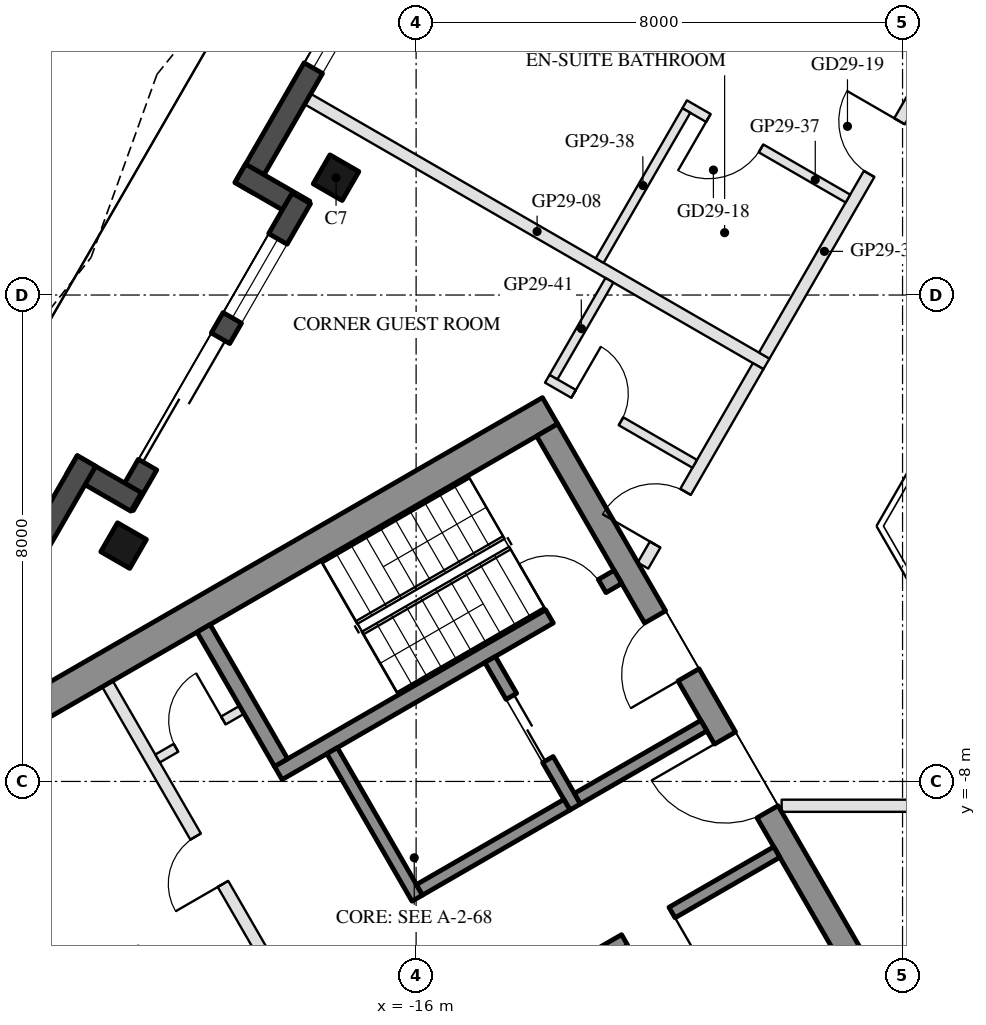
"""IFC4 building model, lengths in metres.
Left out: names, types, materials, properties, quantities, classifications, styles, units other than length and angle.
Written with IfcOpenShell. Run it as: python <this file> out.ifc"""

import sys

from ifc_helpers import new_model, si_unit, direction, frame, frame_2d, origin, origin_2d, place, context, subcontext, project, spatial, rectangle, hollow_rectangle, extrude, boolean, halfspace, element, fill, save


model = new_model("IFC4")
c1 = context("Model", 3, precision=1e-05, world=origin(), true_north=direction((0.0, 1.0)))
c2 = subcontext(c1, "Body", "Model", "MODEL_VIEW")
j1 = project(units=[si_unit("LENGTHUNIT", "METRE"), si_unit("PLANEANGLEUNIT", "RADIAN")], contexts=[c1])
p1 = place(None, origin())
s1 = spatial("IfcSite", under=j1, at=p1, CompositionType="ELEMENT")
p2 = place(p1, origin())
s2 = spatial("IfcBuilding", under=s1, at=p2, CompositionType="ELEMENT")
p3 = place(p2, frame((0.0, 0.0, 294.8)))
s3 = spatial("IfcBuildingStorey", under=s2, at=p3, CompositionType="ELEMENT", Elevation=294.8)
p4 = place(p3, frame((-17.317, 1.93, 0.0), z_axis=(0.0, 0.0, 1.0), x_axis=(0.5, 0.866025403784, 0.0)))
e1 = element("IfcColumn", 1, at=p4, inside=s3, PredefinedType="COLUMN", context=c2, shape_type="SweptSolid", body=[
    boolean("DIFFERENCE", extrude(hollow_rectangle(XDim=0.55, YDim=0.55, WallThickness=0.025, at=origin_2d()), origin(), (0.0, 0.0, 1.0), 3.7), halfspace(frame((0.0, 0.0, 3.666), z_axis=(0.0, 0.0, 1.0), x_axis=(1.0, 0.0, 0.0)), False)),
])
p5 = place(p3, frame((-20.81, -4.121, 0.0), z_axis=(0.0, 0.0, 1.0), x_axis=(0.5, 0.866025403784, 0.0)))
e2 = element("IfcColumn", 2, at=p5, inside=s3, PredefinedType="COLUMN", context=c2, shape_type="SweptSolid", body=[
    boolean("DIFFERENCE", extrude(hollow_rectangle(XDim=0.55, YDim=0.55, WallThickness=0.025, at=origin_2d()), origin(), (0.0, 0.0, 1.0), 3.7), halfspace(frame((0.0, 0.0, 3.66), z_axis=(0.0, 0.0, 1.0), x_axis=(1.0, 0.0, 0.0)), False)),
])
p6 = place(p3, frame((-14.434, 9.373, 0.0), z_axis=(0.0, 0.0, 1.0), x_axis=(-0.499999835575, -0.866025498715, 0.0)))
e3 = element("IfcWall", 3, at=p6, inside=s3, PredefinedType="SOLIDWALL", context=c2, shape_type="SweptSolid", body=[
    extrude(rectangle(XDim=8.787, YDim=0.35, at=frame_2d((4.394, 0.0))), origin(), (0.0, 0.0, 1.0), 3.55),
])
p7 = place(p6, frame((1.719, 0.0, 0.0)))
e4 = element("IfcOpeningElement", 4, at=p7, cuts=e3, PredefinedType="OPENING", context=c2, shape_type="SweptSolid", body=[
    extrude(rectangle(XDim=2.4, YDim=2.4, at=frame_2d((1.2, 1.2))), frame((0.0, 0.185, 0.0), z_axis=(0.0, -1.0, 0.0), x_axis=(1.0, 0.0, 0.0)), (0.0, 0.0, 1.0), 0.37),
])
p8 = place(p6, frame((5.013, 0.0, 0.3)))
e5 = element("IfcOpeningElement", 5, at=p8, cuts=e3, PredefinedType="OPENING", context=c2, shape_type="SweptSolid", body=[
    extrude(rectangle(XDim=1.5, YDim=2.65, at=frame_2d((0.75, 1.325))), frame((0.0, 0.185, 0.0), z_axis=(0.0, -1.0, 0.0), x_axis=(1.0, 0.0, 0.0)), (0.0, 0.0, 1.0), 0.37),
])
p9 = place(p3, frame((-18.892, 2.002, 0.0), z_axis=(0.0, 0.0, 1.0), x_axis=(0.866042269935, -0.499970785833, 0.0)))
e6 = element("IfcWall", 6, at=p9, inside=s3, PredefinedType="SOLIDWALL", context=c2, shape_type="SweptSolid", body=[
    extrude(rectangle(XDim=1.22, YDim=0.35, at=frame_2d((0.61, 0.0))), origin(), (0.0, 0.0, 1.0), 3.55),
])
p10 = place(p3, frame((-17.888, 1.59, 0.0), z_axis=(0.0, 0.0, 1.0), x_axis=(-0.499987198161, -0.866032794804, 0.0)))
e7 = element("IfcWall", 7, at=p10, inside=s3, PredefinedType="SOLIDWALL", context=c2, shape_type="SweptSolid", body=[
    extrude(rectangle(XDim=5.827, YDim=0.35, at=frame_2d((2.914, 0.0))), origin(), (0.0, 0.0, 1.0), 3.55),
])
p11 = place(p10, frame((2.657, 0.0, 0.0)))
e8 = element("IfcOpeningElement", 8, at=p11, cuts=e7, PredefinedType="OPENING", context=c2, shape_type="SweptSolid", body=[
    extrude(rectangle(XDim=2.4, YDim=2.4, at=frame_2d((1.2, 1.2))), frame((0.0, 0.185, 0.0), z_axis=(0.0, -1.0, 0.0), x_axis=(1.0, 0.0, 0.0)), (0.0, 0.0, 1.0), 0.37),
])
p12 = place(p10, frame((0.77, 0.0, 0.3)))
e9 = element("IfcOpeningElement", 9, at=p12, cuts=e7, PredefinedType="OPENING", context=c2, shape_type="SweptSolid", body=[
    extrude(rectangle(XDim=1.5, YDim=2.65, at=frame_2d((0.75, 1.325))), frame((0.0, 0.185, 0.0), z_axis=(0.0, -1.0, 0.0), x_axis=(1.0, 0.0, 0.0)), (0.0, 0.0, 1.0), 0.37),
])
p13 = place(p3, frame((-20.604, -3.403, 0.0), z_axis=(0.0, 0.0, 1.0), x_axis=(-0.866092288191, 0.499884134912, 0.0)))
e10 = element("IfcWall", 10, at=p13, inside=s3, PredefinedType="SOLIDWALL", context=c2, shape_type="SweptSolid", body=[
    extrude(rectangle(XDim=1.22, YDim=0.35, at=frame_2d((0.61, 0.0))), origin(), (0.0, 0.0, 1.0), 3.55),
])
p14 = place(p3, frame((-21.421, -2.729, 0.0), z_axis=(0.0, 0.0, 1.0), x_axis=(-0.500040399856, -0.86600207766, 0.0)))
e11 = element("IfcWall", 11, at=p14, inside=s3, PredefinedType="SOLIDWALL", context=c2, shape_type="SweptSolid", body=[
    extrude(rectangle(XDim=3.567, YDim=0.35, at=frame_2d((1.784, 0.0))), origin(), (0.0, 0.0, 1.0), 3.55),
])
p15 = place(p14, frame((1.525, 0.0, 0.3)))
e12 = element("IfcOpeningElement", 12, at=p15, cuts=e11, PredefinedType="OPENING", context=c2, shape_type="SweptSolid", body=[
    extrude(rectangle(XDim=1.6, YDim=2.65, at=frame_2d((0.8, 1.325))), frame((0.0, 0.185, 0.0), z_axis=(0.0, -1.0, 0.0), x_axis=(1.0, 0.0, 0.0)), (0.0, 0.0, 1.0), 0.37),
])
p16 = place(p3, frame((-23.205, -10.508, 0.0), z_axis=(0.0, 0.0, 1.0), x_axis=(0.500016662025, -0.866015783746, 0.0)))
e13 = element("IfcWall", 13, at=p16, inside=s3, PredefinedType="SOLIDWALL", context=c2, shape_type="SweptSolid", body=[
    extrude(rectangle(XDim=5.004, YDim=0.35, at=frame_2d((2.502, 0.0))), origin(), (0.0, 0.0, 1.0), 3.55),
])
p17 = place(p3, frame((-13.797, -1.903, 0.0), z_axis=(0.0, 0.0, 1.0), x_axis=(-0.866025449148, -0.499999921427, 0.0)))
e14 = element("IfcWall", 14, at=p17, inside=s3, PredefinedType="SHEAR", context=c2, shape_type="SweptSolid", body=[
    extrude(rectangle(XDim=11.222, YDim=0.5, at=frame_2d((5.611, 0.0))), origin(), (0.0, 0.0, 1.0), 3.5),
])
p18 = place(p3, frame((-13.845, -2.22, 0.0), z_axis=(0.0, 0.0, 1.0), x_axis=(0.500004234368, -0.866022959057, 0.0)))
e15 = element("IfcWall", 15, at=p18, inside=s3, PredefinedType="SHEAR", context=c2, shape_type="SweptSolid", body=[
    extrude(rectangle(XDim=10.0, YDim=0.4, at=frame_2d((5.0, 0.0))), origin(), (0.0, 0.0, 1.0), 3.5),
])
p19 = place(p18, frame((3.55, 0.0, 0.0)))
e16 = element("IfcOpeningElement", 16, at=p19, cuts=e15, PredefinedType="OPENING", context=c2, shape_type="SweptSolid", body=[
    extrude(rectangle(XDim=1.1, YDim=2.1, at=frame_2d((0.55, 1.05))), frame((0.0, 0.21, 0.0), z_axis=(0.0, -1.0, 0.0), x_axis=(1.0, 0.0, 0.0)), (0.0, 0.0, 1.0), 0.42),
])
p20 = place(p18, frame((5.85, 0.0, 0.0)))
e17 = element("IfcOpeningElement", 17, at=p20, cuts=e15, PredefinedType="OPENING", context=c2, shape_type="SweptSolid", body=[
    extrude(rectangle(XDim=1.4, YDim=2.1, at=frame_2d((0.7, 1.05))), frame((0.0, 0.21, 0.0), z_axis=(0.0, -1.0, 0.0), x_axis=(1.0, 0.0, 0.0)), (0.0, 0.0, 1.0), 0.42),
])
p21 = place(p3, frame((-12.681, -4.636, 0.0), z_axis=(0.0, 0.0, 1.0), x_axis=(-0.866021702275, -0.500006411147, 0.0)))
e18 = element("IfcWall", 18, at=p21, inside=s3, PredefinedType="SHEAR", context=c2, shape_type="SweptSolid", body=[
    extrude(rectangle(XDim=6.45, YDim=0.25, at=frame_2d((3.225, 0.0))), origin(), (0.0, 0.0, 1.0), 3.5),
])
p22 = place(p21, frame((0.3, 0.0, 0.0)))
e19 = element("IfcOpeningElement", 19, at=p22, cuts=e18, PredefinedType="OPENING", context=c2, shape_type="SweptSolid", body=[
    extrude(rectangle(XDim=1.0, YDim=2.1, at=frame_2d((0.5, 1.05))), frame((0.0, 0.135, 0.0), z_axis=(0.0, -1.0, 0.0), x_axis=(1.0, 0.0, 0.0)), (0.0, 0.0, 1.0), 0.27),
])
p23 = place(p3, frame((-19.496, -5.482, 0.0), z_axis=(0.0, 0.0, 1.0), x_axis=(0.499990435942, -0.866030925526, 0.0)))
e20 = element("IfcWall", 20, at=p23, inside=s3, PredefinedType="SHEAR", context=c2, shape_type="SweptSolid", body=[
    extrude(rectangle(XDim=2.55, YDim=0.25, at=frame_2d((1.275, 0.0))), origin(), (0.0, 0.0, 1.0), 3.5),
])
p24 = place(p3, frame((-17.381, -7.495, 0.0), z_axis=(0.0, 0.0, 1.0), x_axis=(0.500011755427, -0.866018616679, 0.0)))
e21 = element("IfcWall", 21, at=p24, inside=s3, PredefinedType="SHEAR", context=c2, shape_type="SweptSolid", body=[
    extrude(rectangle(XDim=2.8, YDim=0.2, at=frame_2d((1.4, 0.0))), origin(), (0.0, 0.0, 1.0), 3.5),
])
p25 = place(p3, frame((-14.783, -5.995, 0.0), z_axis=(0.0, 0.0, 1.0), x_axis=(0.49994636267, -0.866056369097, 0.0)))
e22 = element("IfcWall", 22, at=p25, inside=s3, PredefinedType="SHEAR", context=c2, shape_type="SweptSolid", body=[
    extrude(rectangle(XDim=2.8, YDim=0.2, at=frame_2d((1.4, 0.0))), origin(), (0.0, 0.0, 1.0), 3.5),
])
p26 = place(p25, frame((0.7, 0.0, 0.0)))
e23 = element("IfcOpeningElement", 23, at=p26, cuts=e22, PredefinedType="OPENING", context=c2, shape_type="SweptSolid", body=[
    extrude(rectangle(XDim=1.2, YDim=2.1, at=frame_2d((0.6, 1.05))), frame((0.0, 0.11, 0.0), z_axis=(0.0, -1.0, 0.0), x_axis=(1.0, 0.0, 0.0)), (0.0, 0.0, 1.0), 0.22),
])
p27 = place(p3, frame((-13.52, -8.383, 0.0), z_axis=(0.0, 0.0, 1.0), x_axis=(-0.866034573852, -0.49998411664, 0.0)))
e24 = element("IfcWall", 24, at=p27, inside=s3, PredefinedType="SHEAR", context=c2, shape_type="SweptSolid", body=[
    extrude(rectangle(XDim=2.8, YDim=0.2, at=frame_2d((1.4, 0.0))), origin(), (0.0, 0.0, 1.0), 3.5),
])
p28 = place(p3, frame((-11.268, -7.083, 0.0), z_axis=(0.0, 0.0, 1.0), x_axis=(-0.866050077142, -0.499957262057, 0.0)))
e25 = element("IfcWall", 25, at=p28, inside=s3, PredefinedType="SHEAR", context=c2, shape_type="SweptSolid", body=[
    extrude(rectangle(XDim=2.4, YDim=0.2, at=frame_2d((1.2, 0.0))), origin(), (0.0, 0.0, 1.0), 3.5),
])
p29 = place(p3, frame((-10.068, -9.162, 0.0), z_axis=(0.0, 0.0, 1.0), x_axis=(-0.866032725843, -0.499987317609, 0.0)))
e26 = element("IfcWall", 26, at=p29, inside=s3, PredefinedType="SHEAR", context=c2, shape_type="SweptSolid", body=[
    extrude(rectangle(XDim=10.16, YDim=0.2, at=frame_2d((5.08, 0.0))), origin(), (0.0, 0.0, 1.0), 3.5),
])
p30 = place(p29, frame((1.99, 0.0, 0.0)))
e27 = element("IfcOpeningElement", 27, at=p30, cuts=e26, PredefinedType="OPENING", context=c2, shape_type="SweptSolid", body=[
    extrude(rectangle(XDim=0.9, YDim=2.1, at=frame_2d((0.45, 1.05))), frame((0.0, 0.11, 0.0), z_axis=(0.0, -1.0, 0.0), x_axis=(1.0, 0.0, 0.0)), (0.0, 0.0, 1.0), 0.22),
])
p31 = place(p29, frame((7.07, 0.0, 0.0)))
e28 = element("IfcOpeningElement", 28, at=p31, cuts=e26, PredefinedType="OPENING", context=c2, shape_type="SweptSolid", body=[
    extrude(rectangle(XDim=0.9, YDim=2.1, at=frame_2d((0.45, 1.05))), frame((0.0, 0.11, 0.0), z_axis=(0.0, -1.0, 0.0), x_axis=(1.0, 0.0, 0.0)), (0.0, 0.0, 1.0), 0.22),
])
p32 = place(p3, frame((-21.076, -6.395, 0.0), z_axis=(0.0, 0.0, 1.0), x_axis=(0.50001468107, -0.866016927499, 0.0)))
e29 = element("IfcWall", 29, at=p32, inside=s3, PredefinedType="PARTITIONING", context=c2, shape_type="SweptSolid", body=[
    extrude(rectangle(XDim=5.4, YDim=0.2, at=frame_2d((2.7, 0.0))), origin(), (0.0, 0.0, 1.0), 3.5),
])
p33 = place(p32, frame((2.9, 0.0, 0.0)))
e30 = element("IfcOpeningElement", 30, at=p33, cuts=e29, PredefinedType="OPENING", context=c2, shape_type="SweptSolid", body=[
    extrude(rectangle(XDim=0.9, YDim=2.1, at=frame_2d((0.45, 1.05))), frame((0.0, 0.11, 0.0), z_axis=(0.0, -1.0, 0.0), x_axis=(1.0, 0.0, 0.0)), (0.0, 0.0, 1.0), 0.22),
])
p34 = place(p3, frame((-18.866, -6.822, 0.0), z_axis=(0.0, 0.0, 1.0), x_axis=(-0.866028054938, -0.499995408039, 0.0)))
e31 = element("IfcWall", 31, at=p34, inside=s3, PredefinedType="PARTITIONING", context=c2, shape_type="SweptSolid", body=[
    extrude(rectangle(XDim=1.6, YDim=0.15, at=frame_2d((0.8, 0.0))), origin(), (0.0, 0.0, 1.0), 3.5),
])
p35 = place(p34, frame((0.35, 0.0, 0.0)))
e32 = element("IfcOpeningElement", 32, at=p35, cuts=e31, PredefinedType="OPENING", context=c2, shape_type="SweptSolid", body=[
    extrude(rectangle(XDim=0.9, YDim=2.1, at=frame_2d((0.45, 1.05))), frame((0.0, 0.085, 0.0), z_axis=(0.0, -1.0, 0.0), x_axis=(1.0, 0.0, 0.0)), (0.0, 0.0, 1.0), 0.17),
])
p36 = place(p3, frame((-17.782, 3.223, 0.0), z_axis=(0.0, 0.0, 1.0), x_axis=(0.866016642396, -0.500015174863, 0.0)))
e33 = element("IfcWall", 33, at=p36, inside=s3, PredefinedType="PARTITIONING", context=c2, shape_type="SweptSolid", body=[
    extrude(rectangle(XDim=8.712, YDim=0.2, at=frame_2d((4.356, 0.0))), origin(), (0.0, 0.0, 1.0), 3.1),
])
p37 = place(p3, frame((-3.588, -8.4, 0.0), z_axis=(0.0, 0.0, 1.0), x_axis=(-1.0, 0.0, 0.0)))
e34 = element("IfcWall", 34, at=p37, inside=s3, PredefinedType="PARTITIONING", context=c2, shape_type="SweptSolid", body=[
    extrude(rectangle(XDim=6.4, YDim=0.2, at=frame_2d((3.2, 0.0))), origin(), (0.0, 0.0, 1.0), 3.05),
])
p38 = place(p37, frame((2.957, 0.0, 0.0)))
e35 = element("IfcOpeningElement", 35, at=p38, cuts=e34, PredefinedType="OPENING", context=c2, shape_type="SweptSolid", body=[
    extrude(rectangle(XDim=1.0, YDim=2.1, at=frame_2d((0.5, 1.05))), frame((0.0, 0.11, 0.0), z_axis=(0.0, -1.0, 0.0), x_axis=(1.0, 0.0, 0.0)), (0.0, 0.0, 1.0), 0.22),
])
p39 = place(p3, frame((-10.275, -0.996, 0.0), z_axis=(0.0, 0.0, 1.0), x_axis=(0.500007539231, 0.866021050964, 0.0)))
e36 = element("IfcWall", 36, at=p39, inside=s3, PredefinedType="PARTITIONING", context=c2, shape_type="SweptSolid", body=[
    extrude(rectangle(XDim=6.598, YDim=0.2, at=frame_2d((3.299, 0.0))), origin(), (0.0, 0.0, 1.0), 3.05),
])
p40 = place(p39, frame((3.45, 0.0, 0.0)))
e37 = element("IfcOpeningElement", 37, at=p40, cuts=e36, PredefinedType="OPENING", context=c2, shape_type="SweptSolid", body=[
    extrude(rectangle(XDim=1.0, YDim=2.1, at=frame_2d((0.5, 1.05))), frame((0.0, 0.11, 0.0), z_axis=(0.0, -1.0, 0.0), x_axis=(1.0, 0.0, 0.0)), (0.0, 0.0, 1.0), 0.22),
])
p41 = place(p3, frame((-8.899, 1.587, 0.0), z_axis=(0.0, 0.0, 1.0), x_axis=(-0.86602952684, 0.49999285859, 0.0)))
e38 = element("IfcWall", 38, at=p41, inside=s3, PredefinedType="PARTITIONING", context=c2, shape_type="SweptSolid", body=[
    extrude(rectangle(XDim=3.1, YDim=0.15, at=frame_2d((1.55, 0.0))), origin(), (0.0, 0.0, 1.0), 3.55),
])
p42 = place(p41, frame((1.65, 0.0, 0.0)))
e39 = element("IfcOpeningElement", 39, at=p42, cuts=e38, PredefinedType="OPENING", context=c2, shape_type="SweptSolid", body=[
    extrude(rectangle(XDim=1.0, YDim=2.1, at=frame_2d((0.5, 1.05))), frame((0.0, 0.085, 0.0), z_axis=(0.0, -1.0, 0.0), x_axis=(1.0, 0.0, 0.0)), (0.0, 0.0, 1.0), 0.17),
])
p43 = place(p3, frame((-11.556, 3.034, 0.0), z_axis=(0.0, 0.0, 1.0), x_axis=(-0.500036373335, -0.866004402611, 0.0)))
e40 = element("IfcWall", 40, at=p43, inside=s3, PredefinedType="PARTITIONING", context=c2, shape_type="SweptSolid", body=[
    extrude(rectangle(XDim=2.85, YDim=0.15, at=frame_2d((1.425, 0.0))), origin(), (0.0, 0.0, 1.0), 3.05),
])
p44 = place(p3, frame((-12.269, -4.45, 0.0), z_axis=(0.0, 0.0, 1.0), x_axis=(0.500055316652, 0.865993464345, 0.0)))
e41 = element("IfcWall", 41, at=p44, inside=s3, PredefinedType="PARTITIONING", context=c2, shape_type="SweptSolid", body=[
    extrude(rectangle(XDim=3.788, YDim=0.2, at=frame_2d((1.894, 0.0))), origin(), (0.0, 0.0, 1.0), 3.05),
])
p45 = place(p44, frame((0.4, 0.0, 0.0)))
e42 = element("IfcOpeningElement", 42, at=p45, cuts=e41, PredefinedType="OPENING", context=c2, shape_type="SweptSolid", body=[
    extrude(rectangle(XDim=1.0, YDim=2.1, at=frame_2d((0.5, 1.05))), frame((0.0, 0.11, 0.0), z_axis=(0.0, -1.0, 0.0), x_axis=(1.0, 0.0, 0.0)), (0.0, 0.0, 1.0), 0.22),
])
p46 = place(p3, frame((-13.843, -1.376, 0.0), z_axis=(0.0, 0.0, 1.0), x_axis=(0.866056369097, -0.49994636267, 0.0)))
e43 = element("IfcWall", 43, at=p46, inside=s3, PredefinedType="PARTITIONING", context=c2, shape_type="SweptSolid", body=[
    extrude(rectangle(XDim=2.8, YDim=0.15, at=frame_2d((1.4, 0.0))), origin(), (0.0, 0.0, 1.0), 3.55),
])
p47 = place(p46, frame((0.5, 0.0, 0.0)))
e44 = element("IfcOpeningElement", 44, at=p47, cuts=e43, PredefinedType="OPENING", context=c2, shape_type="SweptSolid", body=[
    extrude(rectangle(XDim=0.9, YDim=2.1, at=frame_2d((0.45, 1.05))), frame((0.0, 0.085, 0.0), z_axis=(0.0, -1.0, 0.0), x_axis=(1.0, 0.0, 0.0)), (0.0, 0.0, 1.0), 0.17),
])
p48 = place(p3, frame((-12.821, 0.243, 0.0), z_axis=(0.0, 0.0, 1.0), x_axis=(-0.500009850223, -0.866019716681, 0.0)))
e45 = element("IfcWall", 45, at=p48, inside=s3, PredefinedType="PARTITIONING", context=c2, shape_type="SweptSolid", body=[
    extrude(rectangle(XDim=1.838, YDim=0.15, at=frame_2d((0.919, 0.0))), origin(), (0.0, 0.0, 1.0), 3.05),
])
p49 = place(p8, origin())
e46 = element("IfcWindow", 46, at=p49, inside=s3, PartitioningType="SINGLE_PANEL", PredefinedType="WINDOW", context=c2, shape_type="SweptSolid", body=[
    extrude(rectangle(XDim=1.5, YDim=2.65, at=frame_2d((0.75, 1.325))), frame((0.0, 0.03, 0.0), z_axis=(0.0, -1.0, 0.0), x_axis=(1.0, 0.0, 0.0)), (0.0, 0.0, 1.0), 0.06),
])
fill(e5, e46)
p50 = place(p11, frame((2.4, 0.0, 0.0), z_axis=(0.0, 0.0, 1.0), x_axis=(-1.0, 0.0, 0.0)))
e47 = element("IfcDoor", 47, at=p50, inside=s3, OperationType="SLIDING_TO_LEFT", PredefinedType="DOOR", context=c2, shape_type="SweptSolid", body=[
    extrude(rectangle(XDim=2.4, YDim=2.4, at=frame_2d((1.2, 1.2))), frame((0.0, 0.025, 0.0), z_axis=(0.0, -1.0, 0.0), x_axis=(1.0, 0.0, 0.0)), (0.0, 0.0, 1.0), 0.05),
])
fill(e8, e47)
p51 = place(p12, origin())
e48 = element("IfcWindow", 48, at=p51, inside=s3, PartitioningType="SINGLE_PANEL", PredefinedType="WINDOW", context=c2, shape_type="SweptSolid", body=[
    extrude(rectangle(XDim=1.5, YDim=2.65, at=frame_2d((0.75, 1.325))), frame((0.0, 0.03, 0.0), z_axis=(0.0, -1.0, 0.0), x_axis=(1.0, 0.0, 0.0)), (0.0, 0.0, 1.0), 0.06),
])
fill(e9, e48)
p52 = place(p26, origin())
e49 = element("IfcDoor", 49, at=p52, inside=s3, OperationType="DOUBLE_DOOR_SLIDING", PredefinedType="DOOR", context=c2, shape_type="SweptSolid", body=[
    extrude(rectangle(XDim=1.2, YDim=2.1, at=frame_2d((0.6, 1.05))), frame((0.0, 0.025, 0.0), z_axis=(0.0, -1.0, 0.0), x_axis=(1.0, 0.0, 0.0)), (0.0, 0.0, 1.0), 0.05),
])
fill(e23, e49)
p53 = place(p35, frame((0.9, 0.0, 0.0), z_axis=(0.0, 0.0, 1.0), x_axis=(-1.0, 0.0, 0.0)))
e50 = element("IfcDoor", 50, at=p53, inside=s3, OperationType="SINGLE_SWING_RIGHT", PredefinedType="DOOR", context=c2, shape_type="SweptSolid", body=[
    extrude(rectangle(XDim=0.9, YDim=2.1, at=frame_2d((0.45, 1.05))), frame((0.0, 0.025, 0.0), z_axis=(0.0, -1.0, 0.0), x_axis=(1.0, 0.0, 0.0)), (0.0, 0.0, 1.0), 0.05),
])
fill(e32, e50)
p54 = place(p30, origin())
e51 = element("IfcDoor", 51, at=p54, inside=s3, OperationType="SINGLE_SWING_LEFT", PredefinedType="DOOR", context=c2, shape_type="SweptSolid", body=[
    extrude(rectangle(XDim=0.9, YDim=2.1, at=frame_2d((0.45, 1.05))), frame((0.0, 0.025, 0.0), z_axis=(0.0, -1.0, 0.0), x_axis=(1.0, 0.0, 0.0)), (0.0, 0.0, 1.0), 0.05),
])
fill(e27, e51)
p55 = place(p33, frame((0.9, 0.0, 0.0), z_axis=(0.0, 0.0, 1.0), x_axis=(-1.0, 0.0, 0.0)))
e52 = element("IfcDoor", 52, at=p55, inside=s3, OperationType="SINGLE_SWING_LEFT", PredefinedType="DOOR", context=c2, shape_type="SweptSolid", body=[
    extrude(rectangle(XDim=0.9, YDim=2.1, at=frame_2d((0.45, 1.05))), frame((0.0, 0.025, 0.0), z_axis=(0.0, -1.0, 0.0), x_axis=(1.0, 0.0, 0.0)), (0.0, 0.0, 1.0), 0.05),
])
fill(e30, e52)
p56 = place(p19, frame((1.1, 0.0, 0.0), z_axis=(0.0, 0.0, 1.0), x_axis=(-1.0, 0.0, 0.0)))
e53 = element("IfcDoor", 53, at=p56, inside=s3, OperationType="SINGLE_SWING_LEFT", PredefinedType="DOOR", context=c2, shape_type="SweptSolid", body=[
    extrude(rectangle(XDim=1.1, YDim=2.1, at=frame_2d((0.55, 1.05))), frame((0.0, 0.025, 0.0), z_axis=(0.0, -1.0, 0.0), x_axis=(1.0, 0.0, 0.0)), (0.0, 0.0, 1.0), 0.05),
])
fill(e16, e53)
p57 = place(p20, frame((1.4, 0.0, 0.0), z_axis=(0.0, 0.0, 1.0), x_axis=(-1.0, 0.0, 0.0)))
e54 = element("IfcDoor", 54, at=p57, inside=s3, OperationType="DOUBLE_DOOR_SINGLE_SWING", PredefinedType="DOOR", context=c2, shape_type="SweptSolid", body=[
    extrude(rectangle(XDim=1.4, YDim=2.1, at=frame_2d((0.7, 1.05))), frame((0.0, 0.025, 0.0), z_axis=(0.0, -1.0, 0.0), x_axis=(1.0, 0.0, 0.0)), (0.0, 0.0, 1.0), 0.05),
])
fill(e17, e54)
p58 = place(p22, frame((1.0, 0.0, 0.0), z_axis=(0.0, 0.0, 1.0), x_axis=(-1.0, 0.0, 0.0)))
e55 = element("IfcDoor", 55, at=p58, inside=s3, OperationType="SINGLE_SWING_LEFT", PredefinedType="DOOR", context=c2, shape_type="SweptSolid", body=[
    extrude(rectangle(XDim=1.0, YDim=2.1, at=frame_2d((0.5, 1.05))), frame((0.0, 0.025, 0.0), z_axis=(0.0, -1.0, 0.0), x_axis=(1.0, 0.0, 0.0)), (0.0, 0.0, 1.0), 0.05),
])
fill(e19, e55)
p59 = place(p42, origin())
e56 = element("IfcDoor", 56, at=p59, inside=s3, OperationType="SINGLE_SWING_RIGHT", PredefinedType="DOOR", context=c2, shape_type="SweptSolid", body=[
    extrude(rectangle(XDim=1.0, YDim=2.1, at=frame_2d((0.5, 1.05))), frame((0.0, 0.025, 0.0), z_axis=(0.0, -1.0, 0.0), x_axis=(1.0, 0.0, 0.0)), (0.0, 0.0, 1.0), 0.05),
])
fill(e39, e56)
p60 = place(p40, origin())
e57 = element("IfcDoor", 57, at=p60, inside=s3, OperationType="SINGLE_SWING_RIGHT", PredefinedType="DOOR", context=c2, shape_type="SweptSolid", body=[
    extrude(rectangle(XDim=1.0, YDim=2.1, at=frame_2d((0.5, 1.05))), frame((0.0, 0.025, 0.0), z_axis=(0.0, -1.0, 0.0), x_axis=(1.0, 0.0, 0.0)), (0.0, 0.0, 1.0), 0.05),
])
fill(e37, e57)
p61 = place(p47, origin())
e58 = element("IfcDoor", 58, at=p61, inside=s3, OperationType="SINGLE_SWING_LEFT", PredefinedType="DOOR", context=c2, shape_type="SweptSolid", body=[
    extrude(rectangle(XDim=0.9, YDim=2.1, at=frame_2d((0.45, 1.05))), frame((0.0, 0.025, 0.0), z_axis=(0.0, -1.0, 0.0), x_axis=(1.0, 0.0, 0.0)), (0.0, 0.0, 1.0), 0.05),
])
fill(e44, e58)
p62 = place(p45, origin())
e59 = element("IfcDoor", 59, at=p62, inside=s3, OperationType="SINGLE_SWING_LEFT", PredefinedType="DOOR", context=c2, shape_type="SweptSolid", body=[
    extrude(rectangle(XDim=1.0, YDim=2.1, at=frame_2d((0.5, 1.05))), frame((0.0, 0.025, 0.0), z_axis=(0.0, -1.0, 0.0), x_axis=(1.0, 0.0, 0.0)), (0.0, 0.0, 1.0), 0.05),
])
fill(e42, e59)
save(model, sys.argv[1])
